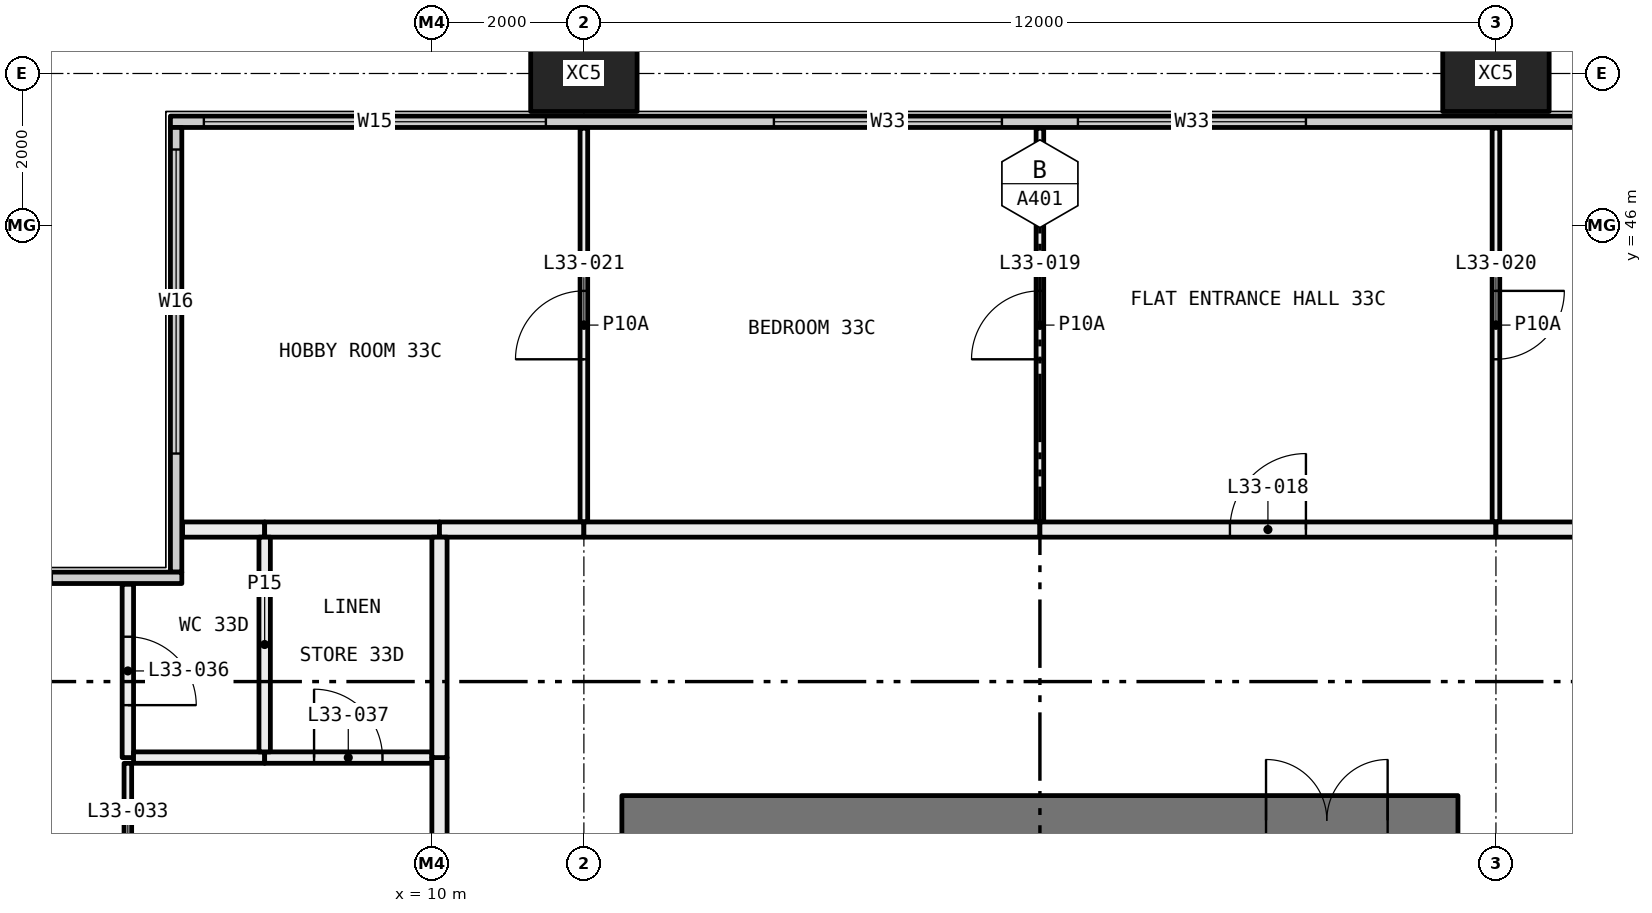
"""IFC4 building model, lengths in metres.
Left out: names, types, materials, properties, quantities, classifications, styles, units other than length and angle.
Written with IfcOpenShell. Run it as: python <this file> out.ifc"""

import sys

from ifc_helpers import new_model, si_unit, direction, frame, frame_2d, origin, origin_2d, place, context, subcontext, project, spatial, rectangle, hollow_rectangle, extrude, element, fill, save


model = new_model("IFC4")
c1 = context("Model", 3, precision=1e-05, world=origin(), true_north=direction((0.0, 1.0)))
c2 = subcontext(c1, "Body", "Model", "MODEL_VIEW")
j1 = project(units=[si_unit("LENGTHUNIT", "METRE"), si_unit("PLANEANGLEUNIT", "RADIAN")], contexts=[c1])
p1 = place(None, origin())
s1 = spatial("IfcSite", under=j1, at=p1, CompositionType="ELEMENT")
p2 = place(p1, origin())
s2 = spatial("IfcBuilding", under=s1, at=p2, CompositionType="ELEMENT")
p3 = place(p2, frame((0.0, 0.0, 127.65)))
s3 = spatial("IfcBuildingStorey", under=s2, at=p3, CompositionType="ELEMENT", Elevation=127.65)
for number, where, z_axis, x_axis in (
    (1, (12.0, 48.0, -0.4), (0.0, 0.0, 1.0), (1.0, 0.0, 0.0)),
    (2, (24.0, 48.0, -0.4), (0.0, 0.0, 1.0), (1.0, 0.0, 0.0)),
):
    element("IfcColumn", number, at=place(p3, frame(where, z_axis=z_axis, x_axis=x_axis)), inside=s3, PredefinedType="COLUMN", context=c2, shape_type="SweptSolid", body=[
        extrude(hollow_rectangle(XDim=1.4, YDim=1.0, WallThickness=0.055, at=origin_2d()), origin(), (0.0, 0.0, 1.0), 3.45),
    ])
p4 = place(p3, frame((6.56, 47.365, 0.0), z_axis=(0.0, 0.0, 1.0), x_axis=(1.0, 0.0, 0.0)))
e3 = element("IfcWall", 3, at=p4, inside=s3, PredefinedType="ELEMENTEDWALL", context=c2, shape_type="SweptSolid", body=[
    extrude(rectangle(XDim=58.88, YDim=0.15, at=frame_2d((29.44, 0.0))), origin(), (0.0, 0.0, 1.0), 3.05),
])
p5 = place(p4, frame((0.44, 0.0, 0.45)))
e4 = element("IfcOpeningElement", 4, at=p5, cuts=e3, PredefinedType="OPENING", context=c2, shape_type="SweptSolid", body=[
    extrude(rectangle(XDim=4.5, YDim=2.55, at=frame_2d((2.25, 1.275))), frame((0.0, 0.085, 0.0), z_axis=(0.0, -1.0, 0.0), x_axis=(1.0, 0.0, 0.0)), (0.0, 0.0, 1.0), 0.17),
])
p6 = place(p4, frame((7.94, 0.0, 0.45)))
e5 = element("IfcOpeningElement", 5, at=p6, cuts=e3, PredefinedType="OPENING", context=c2, shape_type="SweptSolid", body=[
    extrude(rectangle(XDim=3.0, YDim=2.55, at=frame_2d((1.5, 1.275))), frame((0.0, 0.085, 0.0), z_axis=(0.0, -1.0, 0.0), x_axis=(1.0, 0.0, 0.0)), (0.0, 0.0, 1.0), 0.17),
])
p7 = place(p4, frame((11.94, 0.0, 0.45)))
e6 = element("IfcOpeningElement", 6, at=p7, cuts=e3, PredefinedType="OPENING", context=c2, shape_type="SweptSolid", body=[
    extrude(rectangle(XDim=3.0, YDim=2.55, at=frame_2d((1.5, 1.275))), frame((0.0, 0.085, 0.0), z_axis=(0.0, -1.0, 0.0), x_axis=(1.0, 0.0, 0.0)), (0.0, 0.0, 1.0), 0.17),
])
p8 = place(p4, frame((19.94, 0.0, 0.45)))
e7 = element("IfcOpeningElement", 7, at=p8, cuts=e3, PredefinedType="OPENING", context=c2, shape_type="SweptSolid", body=[
    extrude(rectangle(XDim=3.0, YDim=2.55, at=frame_2d((1.5, 1.275))), frame((0.0, 0.085, 0.0), z_axis=(0.0, -1.0, 0.0), x_axis=(1.0, 0.0, 0.0)), (0.0, 0.0, 1.0), 0.17),
])
p9 = place(p4, frame((23.94, 0.0, 0.45)))
e8 = element("IfcOpeningElement", 8, at=p9, cuts=e3, PredefinedType="OPENING", context=c2, shape_type="SweptSolid", body=[
    extrude(rectangle(XDim=2.0, YDim=2.55, at=frame_2d((1.0, 1.275))), frame((0.0, 0.085, 0.0), z_axis=(0.0, -1.0, 0.0), x_axis=(1.0, 0.0, 0.0)), (0.0, 0.0, 1.0), 0.17),
])
p10 = place(p4, frame((31.94, 0.0, 0.45)))
e9 = element("IfcOpeningElement", 9, at=p10, cuts=e3, PredefinedType="OPENING", context=c2, shape_type="SweptSolid", body=[
    extrude(rectangle(XDim=3.0, YDim=2.55, at=frame_2d((1.5, 1.275))), frame((0.0, 0.085, 0.0), z_axis=(0.0, -1.0, 0.0), x_axis=(1.0, 0.0, 0.0)), (0.0, 0.0, 1.0), 0.17),
])
p11 = place(p4, frame((35.94, 0.0, 0.45)))
e10 = element("IfcOpeningElement", 10, at=p11, cuts=e3, PredefinedType="OPENING", context=c2, shape_type="SweptSolid", body=[
    extrude(rectangle(XDim=3.0, YDim=2.55, at=frame_2d((1.5, 1.275))), frame((0.0, 0.085, 0.0), z_axis=(0.0, -1.0, 0.0), x_axis=(1.0, 0.0, 0.0)), (0.0, 0.0, 1.0), 0.17),
])
p12 = place(p4, frame((43.94, 0.0, 0.45)))
e11 = element("IfcOpeningElement", 11, at=p12, cuts=e3, PredefinedType="OPENING", context=c2, shape_type="SweptSolid", body=[
    extrude(rectangle(XDim=3.0, YDim=2.55, at=frame_2d((1.5, 1.275))), frame((0.0, 0.085, 0.0), z_axis=(0.0, -1.0, 0.0), x_axis=(1.0, 0.0, 0.0)), (0.0, 0.0, 1.0), 0.17),
])
p13 = place(p4, frame((47.94, 0.0, 0.45)))
e12 = element("IfcOpeningElement", 12, at=p13, cuts=e3, PredefinedType="OPENING", context=c2, shape_type="SweptSolid", body=[
    extrude(rectangle(XDim=2.0, YDim=2.55, at=frame_2d((1.0, 1.275))), frame((0.0, 0.085, 0.0), z_axis=(0.0, -1.0, 0.0), x_axis=(1.0, 0.0, 0.0)), (0.0, 0.0, 1.0), 0.17),
])
p14 = place(p4, frame((53.94, 0.0, 0.45)))
e13 = element("IfcOpeningElement", 13, at=p14, cuts=e3, PredefinedType="OPENING", context=c2, shape_type="SweptSolid", body=[
    extrude(rectangle(XDim=4.5, YDim=2.55, at=frame_2d((2.25, 1.275))), frame((0.0, 0.085, 0.0), z_axis=(0.0, -1.0, 0.0), x_axis=(1.0, 0.0, 0.0)), (0.0, 0.0, 1.0), 0.17),
])
p15 = place(p3, frame((6.635, 41.44, 0.0), z_axis=(0.0, 0.0, 1.0), x_axis=(0.0, 1.0, 0.0)))
e14 = element("IfcWall", 14, at=p15, inside=s3, PredefinedType="ELEMENTEDWALL", context=c2, shape_type="SweptSolid", body=[
    extrude(rectangle(XDim=5.85, YDim=0.15, at=frame_2d((2.925, 0.0))), origin(), (0.0, 0.0, 1.0), 3.05),
])
p16 = place(p15, frame((1.56, 0.0, 0.45)))
e15 = element("IfcOpeningElement", 15, at=p16, cuts=e14, PredefinedType="OPENING", context=c2, shape_type="SweptSolid", body=[
    extrude(rectangle(XDim=4.0, YDim=2.55, at=frame_2d((2.0, 1.275))), frame((0.0, 0.085, 0.0), z_axis=(0.0, -1.0, 0.0), x_axis=(1.0, 0.0, 0.0)), (0.0, 0.0, 1.0), 0.17),
])
p17 = place(p3, frame((0.56, 41.365, 0.0), z_axis=(0.0, 0.0, 1.0), x_axis=(1.0, 0.0, 0.0)))
e16 = element("IfcWall", 16, at=p17, inside=s3, PredefinedType="ELEMENTEDWALL", context=c2, shape_type="SweptSolid", body=[
    extrude(rectangle(XDim=6.15, YDim=0.15, at=frame_2d((3.075, 0.0))), origin(), (0.0, 0.0, 1.0), 3.05),
])
p18 = place(p17, frame((0.44, 0.0, 0.45)))
e17 = element("IfcOpeningElement", 17, at=p18, cuts=e16, PredefinedType="OPENING", context=c2, shape_type="SweptSolid", body=[
    extrude(rectangle(XDim=4.0, YDim=2.55, at=frame_2d((2.0, 1.275))), frame((0.0, 0.085, 0.0), z_axis=(0.0, -1.0, 0.0), x_axis=(1.0, 0.0, 0.0)), (0.0, 0.0, 1.0), 0.17),
])
p19 = place(p3, frame((12.0, 42.1, 0.0), z_axis=(0.0, 0.0, 1.0), x_axis=(0.0, 1.0, 0.0)))
e18 = element("IfcWall", 18, at=p19, inside=s3, PredefinedType="PARTITIONING", context=c2, shape_type="SweptSolid", body=[
    extrude(rectangle(XDim=5.18, YDim=0.1, at=frame_2d((2.59, 0.0))), origin(), (0.0, 0.0, 1.0), 3.05),
])
p20 = place(p19, frame((2.14, 0.0, 0.0)))
e19 = element("IfcOpeningElement", 19, at=p20, cuts=e18, PredefinedType="OPENING", context=c2, shape_type="SweptSolid", body=[
    extrude(rectangle(XDim=0.9, YDim=2.1, at=frame_2d((0.45, 1.05))), frame((0.0, 0.06, 0.0), z_axis=(0.0, -1.0, 0.0), x_axis=(1.0, 0.0, 0.0)), (0.0, 0.0, 1.0), 0.12),
])
p21 = place(p3, frame((6.72, 42.0, 0.0), z_axis=(0.0, 0.0, 1.0), x_axis=(1.0, 0.0, 0.0)))
e20 = element("IfcWall", 20, at=p21, inside=s3, PredefinedType="PARTITIONING", context=c2, shape_type="SweptSolid", body=[
    extrude(rectangle(XDim=1.08, YDim=0.2, at=frame_2d((0.54, 0.0))), origin(), (0.0, 0.0, 1.0), 3.05),
])
p22 = place(p3, frame((7.8, 42.0, 0.0), z_axis=(0.0, 0.0, 1.0), x_axis=(1.0, 0.0, 0.0)))
e21 = element("IfcWall", 21, at=p22, inside=s3, PredefinedType="PARTITIONING", context=c2, shape_type="SweptSolid", body=[
    extrude(rectangle(XDim=2.3, YDim=0.2, at=frame_2d((1.15, 0.0))), origin(), (0.0, 0.0, 1.0), 3.05),
])
p23 = place(p3, frame((10.1, 42.0, 0.0), z_axis=(0.0, 0.0, 1.0), x_axis=(1.0, 0.0, 0.0)))
e22 = element("IfcWall", 22, at=p23, inside=s3, PredefinedType="PARTITIONING", context=c2, shape_type="SweptSolid", body=[
    extrude(rectangle(XDim=1.9, YDim=0.2, at=frame_2d((0.95, 0.0))), origin(), (0.0, 0.0, 1.0), 3.05),
])
p24 = place(p3, frame((18.0, 42.1, 0.0), z_axis=(0.0, 0.0, 1.0), x_axis=(0.0, 1.0, 0.0)))
e23 = element("IfcWall", 23, at=p24, inside=s3, PredefinedType="PARTITIONING", context=c2, shape_type="SweptSolid", body=[
    extrude(rectangle(XDim=5.18, YDim=0.1, at=frame_2d((2.59, 0.0))), origin(), (0.0, 0.0, 1.0), 3.05),
])
p25 = place(p24, frame((2.14, 0.0, 0.0)))
e24 = element("IfcOpeningElement", 24, at=p25, cuts=e23, PredefinedType="OPENING", context=c2, shape_type="SweptSolid", body=[
    extrude(rectangle(XDim=0.9, YDim=2.1, at=frame_2d((0.45, 1.05))), frame((0.0, 0.06, 0.0), z_axis=(0.0, -1.0, 0.0), x_axis=(1.0, 0.0, 0.0)), (0.0, 0.0, 1.0), 0.12),
])
p26 = place(p3, frame((12.0, 42.0, 0.0), z_axis=(0.0, 0.0, 1.0), x_axis=(1.0, 0.0, 0.0)))
e25 = element("IfcWall", 25, at=p26, inside=s3, PredefinedType="PARTITIONING", context=c2, shape_type="SweptSolid", body=[
    extrude(rectangle(XDim=6.0, YDim=0.2, at=frame_2d((3.0, 0.0))), origin(), (0.0, 0.0, 1.0), 3.05),
])
p27 = place(p3, frame((24.0, 42.1, 0.0), z_axis=(0.0, 0.0, 1.0), x_axis=(0.0, 1.0, 0.0)))
e26 = element("IfcWall", 26, at=p27, inside=s3, PredefinedType="PARTITIONING", context=c2, shape_type="SweptSolid", body=[
    extrude(rectangle(XDim=5.18, YDim=0.1, at=frame_2d((2.59, 0.0))), origin(), (0.0, 0.0, 1.0), 3.05),
])
p28 = place(p27, frame((2.14, 0.0, 0.0)))
e27 = element("IfcOpeningElement", 27, at=p28, cuts=e26, PredefinedType="OPENING", context=c2, shape_type="SweptSolid", body=[
    extrude(rectangle(XDim=0.9, YDim=2.1, at=frame_2d((0.45, 1.05))), frame((0.0, 0.06, 0.0), z_axis=(0.0, -1.0, 0.0), x_axis=(1.0, 0.0, 0.0)), (0.0, 0.0, 1.0), 0.12),
])
p29 = place(p3, frame((18.0, 42.0, 0.0), z_axis=(0.0, 0.0, 1.0), x_axis=(1.0, 0.0, 0.0)))
e28 = element("IfcWall", 28, at=p29, inside=s3, PredefinedType="PARTITIONING", context=c2, shape_type="SweptSolid", body=[
    extrude(rectangle(XDim=6.0, YDim=0.2, at=frame_2d((3.0, 0.0))), origin(), (0.0, 0.0, 1.0), 3.05),
])
p30 = place(p29, frame((2.5, 0.0, 0.0)))
e29 = element("IfcOpeningElement", 29, at=p30, cuts=e28, PredefinedType="OPENING", context=c2, shape_type="SweptSolid", body=[
    extrude(rectangle(XDim=1.0, YDim=2.1, at=frame_2d((0.5, 1.05))), frame((0.0, 0.11, 0.0), z_axis=(0.0, -1.0, 0.0), x_axis=(1.0, 0.0, 0.0)), (0.0, 0.0, 1.0), 0.22),
])
p31 = place(p3, frame((24.0, 42.0, 0.0), z_axis=(0.0, 0.0, 1.0), x_axis=(1.0, 0.0, 0.0)))
e30 = element("IfcWall", 30, at=p31, inside=s3, PredefinedType="PARTITIONING", context=c2, shape_type="SweptSolid", body=[
    extrude(rectangle(XDim=1.9, YDim=0.2, at=frame_2d((0.95, 0.0))), origin(), (0.0, 0.0, 1.0), 3.05),
])
p32 = place(p3, frame((6.0, 36.05, 0.0), z_axis=(0.0, 0.0, 1.0), x_axis=(0.0, 1.0, 0.0)))
e31 = element("IfcWall", 31, at=p32, inside=s3, PredefinedType="PARTITIONING", context=c2, shape_type="SweptSolid", body=[
    extrude(rectangle(XDim=2.875, YDim=0.1, at=frame_2d((1.438, 0.0))), origin(), (0.0, 0.0, 1.0), 2.45),
])
p33 = place(p32, frame((0.988, 0.0, 0.0)))
e32 = element("IfcOpeningElement", 32, at=p33, cuts=e31, PredefinedType="OPENING", context=c2, shape_type="SweptSolid", body=[
    extrude(rectangle(XDim=0.9, YDim=2.1, at=frame_2d((0.45, 1.05))), frame((0.0, 0.06, 0.0), z_axis=(0.0, -1.0, 0.0), x_axis=(1.0, 0.0, 0.0)), (0.0, 0.0, 1.0), 0.12),
])
p34 = place(p3, frame((6.0, 39.0, 0.0), z_axis=(0.0, 0.0, 1.0), x_axis=(0.0, 1.0, 0.0)))
e33 = element("IfcWall", 33, at=p34, inside=s3, PredefinedType="PARTITIONING", context=c2, shape_type="SweptSolid", body=[
    extrude(rectangle(XDim=2.28, YDim=0.15, at=frame_2d((1.14, 0.0))), origin(), (0.0, 0.0, 1.0), 3.05),
])
p35 = place(p34, frame((0.69, 0.0, 0.0)))
e34 = element("IfcOpeningElement", 34, at=p35, cuts=e33, PredefinedType="OPENING", context=c2, shape_type="SweptSolid", body=[
    extrude(rectangle(XDim=0.9, YDim=2.1, at=frame_2d((0.45, 1.05))), frame((0.0, 0.085, 0.0), z_axis=(0.0, -1.0, 0.0), x_axis=(1.0, 0.0, 0.0)), (0.0, 0.0, 1.0), 0.17),
])
p36 = place(p3, frame((7.8, 39.0, 0.0), z_axis=(0.0, 0.0, 1.0), x_axis=(-1.0, 0.0, 0.0)))
e35 = element("IfcWall", 35, at=p36, inside=s3, PredefinedType="PARTITIONING", context=c2, shape_type="SweptSolid", body=[
    extrude(rectangle(XDim=1.725, YDim=0.15, at=frame_2d((0.863, 0.0))), origin(), (0.0, 0.0, 1.0), 3.05),
])
p37 = place(p3, frame((10.0, 39.0, 0.0), z_axis=(0.0, 0.0, 1.0), x_axis=(-1.0, 0.0, 0.0)))
e36 = element("IfcWall", 36, at=p37, inside=s3, PredefinedType="PARTITIONING", context=c2, shape_type="SweptSolid", body=[
    extrude(rectangle(XDim=2.2, YDim=0.15, at=frame_2d((1.1, 0.0))), origin(), (0.0, 0.0, 1.0), 3.05),
])
p38 = place(p37, frame((0.65, 0.0, 0.0)))
e37 = element("IfcOpeningElement", 37, at=p38, cuts=e36, PredefinedType="OPENING", context=c2, shape_type="SweptSolid", body=[
    extrude(rectangle(XDim=0.9, YDim=2.1, at=frame_2d((0.45, 1.05))), frame((0.0, 0.085, 0.0), z_axis=(0.0, -1.0, 0.0), x_axis=(1.0, 0.0, 0.0)), (0.0, 0.0, 1.0), 0.17),
])
p39 = place(p3, frame((10.1, 36.1, 0.0), z_axis=(0.0, 0.0, 1.0), x_axis=(0.0, 1.0, 0.0)))
e38 = element("IfcWall", 38, at=p39, inside=s3, PredefinedType="PARTITIONING", context=c2, shape_type="SweptSolid", body=[
    extrude(rectangle(XDim=2.9, YDim=0.2, at=frame_2d((1.45, 0.0))), origin(), (0.0, 0.0, 1.0), 3.05),
])
p40 = place(p3, frame((7.8, 39.075, 0.0), z_axis=(0.0, 0.0, 1.0), x_axis=(0.0, 1.0, 0.0)))
e39 = element("IfcWall", 39, at=p40, inside=s3, PredefinedType="PARTITIONING", context=c2, shape_type="SweptSolid", body=[
    extrude(rectangle(XDim=2.825, YDim=0.15, at=frame_2d((1.413, 0.0))), origin(), (0.0, 0.0, 1.0), 3.05),
])
p41 = place(p3, frame((10.1, 39.0, 0.0), z_axis=(0.0, 0.0, 1.0), x_axis=(0.0, 1.0, 0.0)))
e40 = element("IfcWall", 40, at=p41, inside=s3, PredefinedType="PARTITIONING", context=c2, shape_type="SweptSolid", body=[
    extrude(rectangle(XDim=2.9, YDim=0.2, at=frame_2d((1.45, 0.0))), origin(), (0.0, 0.0, 1.0), 3.05),
])
p42 = place(p3, frame((12.5, 38.175, 0.0), z_axis=(0.0, 0.0, 1.0), x_axis=(1.0, 0.0, 0.0)))
e41 = element("IfcWall", 41, at=p42, inside=s3, PredefinedType="SHEAR", context=c2, shape_type="SweptSolid", body=[
    extrude(rectangle(XDim=11.0, YDim=0.65, at=frame_2d((5.5, 0.0))), origin(), (0.0, 0.0, 1.0), 3.05),
])
p43 = place(p42, frame((8.475, 0.0, 0.0)))
e42 = element("IfcOpeningElement", 42, at=p43, cuts=e41, PredefinedType="OPENING", context=c2, shape_type="SweptSolid", body=[
    extrude(rectangle(XDim=1.6, YDim=2.1, at=frame_2d((0.8, 1.05))), frame((0.0, 0.335, 0.0), z_axis=(0.0, -1.0, 0.0), x_axis=(1.0, 0.0, 0.0)), (0.0, 0.0, 1.0), 0.67),
])
p44 = place(p5, origin())
e43 = element("IfcWindow", 43, at=p44, inside=s3, PartitioningType="SINGLE_PANEL", PredefinedType="WINDOW", context=c2, shape_type="SweptSolid", body=[
    extrude(rectangle(XDim=4.5, YDim=2.55, at=frame_2d((2.25, 1.275))), frame((0.0, 0.03, 0.0), z_axis=(0.0, -1.0, 0.0), x_axis=(1.0, 0.0, 0.0)), (0.0, 0.0, 1.0), 0.06),
])
fill(e4, e43)
p45 = place(p6, origin())
e44 = element("IfcWindow", 44, at=p45, inside=s3, PartitioningType="SINGLE_PANEL", PredefinedType="WINDOW", context=c2, shape_type="SweptSolid", body=[
    extrude(rectangle(XDim=3.0, YDim=2.55, at=frame_2d((1.5, 1.275))), frame((0.0, 0.03, 0.0), z_axis=(0.0, -1.0, 0.0), x_axis=(1.0, 0.0, 0.0)), (0.0, 0.0, 1.0), 0.06),
])
fill(e5, e44)
p46 = place(p7, origin())
e45 = element("IfcWindow", 45, at=p46, inside=s3, PartitioningType="SINGLE_PANEL", PredefinedType="WINDOW", context=c2, shape_type="SweptSolid", body=[
    extrude(rectangle(XDim=3.0, YDim=2.55, at=frame_2d((1.5, 1.275))), frame((0.0, 0.03, 0.0), z_axis=(0.0, -1.0, 0.0), x_axis=(1.0, 0.0, 0.0)), (0.0, 0.0, 1.0), 0.06),
])
fill(e6, e45)
p47 = place(p16, origin())
e46 = element("IfcWindow", 46, at=p47, inside=s3, PartitioningType="SINGLE_PANEL", PredefinedType="WINDOW", context=c2, shape_type="SweptSolid", body=[
    extrude(rectangle(XDim=4.0, YDim=2.55, at=frame_2d((2.0, 1.275))), frame((0.0, 0.03, 0.0), z_axis=(0.0, -1.0, 0.0), x_axis=(1.0, 0.0, 0.0)), (0.0, 0.0, 1.0), 0.06),
])
fill(e15, e46)
p48 = place(p30, origin())
e47 = element("IfcDoor", 47, at=p48, inside=s3, OperationType="SINGLE_SWING_LEFT", PredefinedType="DOOR", context=c2, shape_type="SweptSolid", body=[
    extrude(rectangle(XDim=1.0, YDim=2.1, at=frame_2d((0.5, 1.05))), frame((0.0, 0.025, 0.0), z_axis=(0.0, -1.0, 0.0), x_axis=(1.0, 0.0, 0.0)), (0.0, 0.0, 1.0), 0.05),
])
fill(e29, e47)
p49 = place(p25, origin())
e48 = element("IfcDoor", 48, at=p49, inside=s3, OperationType="SINGLE_SWING_RIGHT", PredefinedType="DOOR", context=c2, shape_type="SweptSolid", body=[
    extrude(rectangle(XDim=0.9, YDim=2.1, at=frame_2d((0.45, 1.05))), frame((0.0, 0.025, 0.0), z_axis=(0.0, -1.0, 0.0), x_axis=(1.0, 0.0, 0.0)), (0.0, 0.0, 1.0), 0.05),
])
fill(e24, e48)
p50 = place(p28, frame((0.9, 0.0, 0.0), x_axis=(-1.0, 0.0, 0.0)))
e49 = element("IfcDoor", 49, at=p50, inside=s3, OperationType="SINGLE_SWING_RIGHT", PredefinedType="DOOR", context=c2, shape_type="SweptSolid", body=[
    extrude(rectangle(XDim=0.9, YDim=2.1, at=frame_2d((0.45, 1.05))), frame((0.0, 0.025, 0.0), z_axis=(0.0, -1.0, 0.0), x_axis=(1.0, 0.0, 0.0)), (0.0, 0.0, 1.0), 0.05),
])
fill(e27, e49)
p51 = place(p20, origin())
e50 = element("IfcDoor", 50, at=p51, inside=s3, OperationType="SINGLE_SWING_RIGHT", PredefinedType="DOOR", context=c2, shape_type="SweptSolid", body=[
    extrude(rectangle(XDim=0.9, YDim=2.1, at=frame_2d((0.45, 1.05))), frame((0.0, 0.025, 0.0), z_axis=(0.0, -1.0, 0.0), x_axis=(1.0, 0.0, 0.0)), (0.0, 0.0, 1.0), 0.05),
])
fill(e19, e50)
p52 = place(p35, frame((0.9, 0.0, 0.0), x_axis=(-1.0, 0.0, 0.0)))
e51 = element("IfcDoor", 51, at=p52, inside=s3, OperationType="SINGLE_SWING_LEFT", PredefinedType="DOOR", context=c2, shape_type="SweptSolid", body=[
    extrude(rectangle(XDim=0.9, YDim=2.1, at=frame_2d((0.45, 1.05))), frame((0.0, 0.025, 0.0), z_axis=(0.0, -1.0, 0.0), x_axis=(1.0, 0.0, 0.0)), (0.0, 0.0, 1.0), 0.05),
])
fill(e34, e51)
p53 = place(p38, frame((0.9, 0.0, 0.0), x_axis=(-1.0, 0.0, 0.0)))
e52 = element("IfcDoor", 52, at=p53, inside=s3, OperationType="SINGLE_SWING_RIGHT", PredefinedType="DOOR", context=c2, shape_type="SweptSolid", body=[
    extrude(rectangle(XDim=0.9, YDim=2.1, at=frame_2d((0.45, 1.05))), frame((0.0, 0.025, 0.0), z_axis=(0.0, -1.0, 0.0), x_axis=(1.0, 0.0, 0.0)), (0.0, 0.0, 1.0), 0.05),
])
fill(e37, e52)
p54 = place(p43, origin())
e53 = element("IfcDoor", 53, at=p54, inside=s3, OperationType="DOUBLE_DOOR_SINGLE_SWING", PredefinedType="DOOR", context=c2, shape_type="SweptSolid", body=[
    extrude(rectangle(XDim=1.6, YDim=2.1, at=frame_2d((0.8, 1.05))), frame((0.0, 0.025, 0.0), z_axis=(0.0, -1.0, 0.0), x_axis=(1.0, 0.0, 0.0)), (0.0, 0.0, 1.0), 0.05),
])
fill(e42, e53)
save(model, sys.argv[1])
